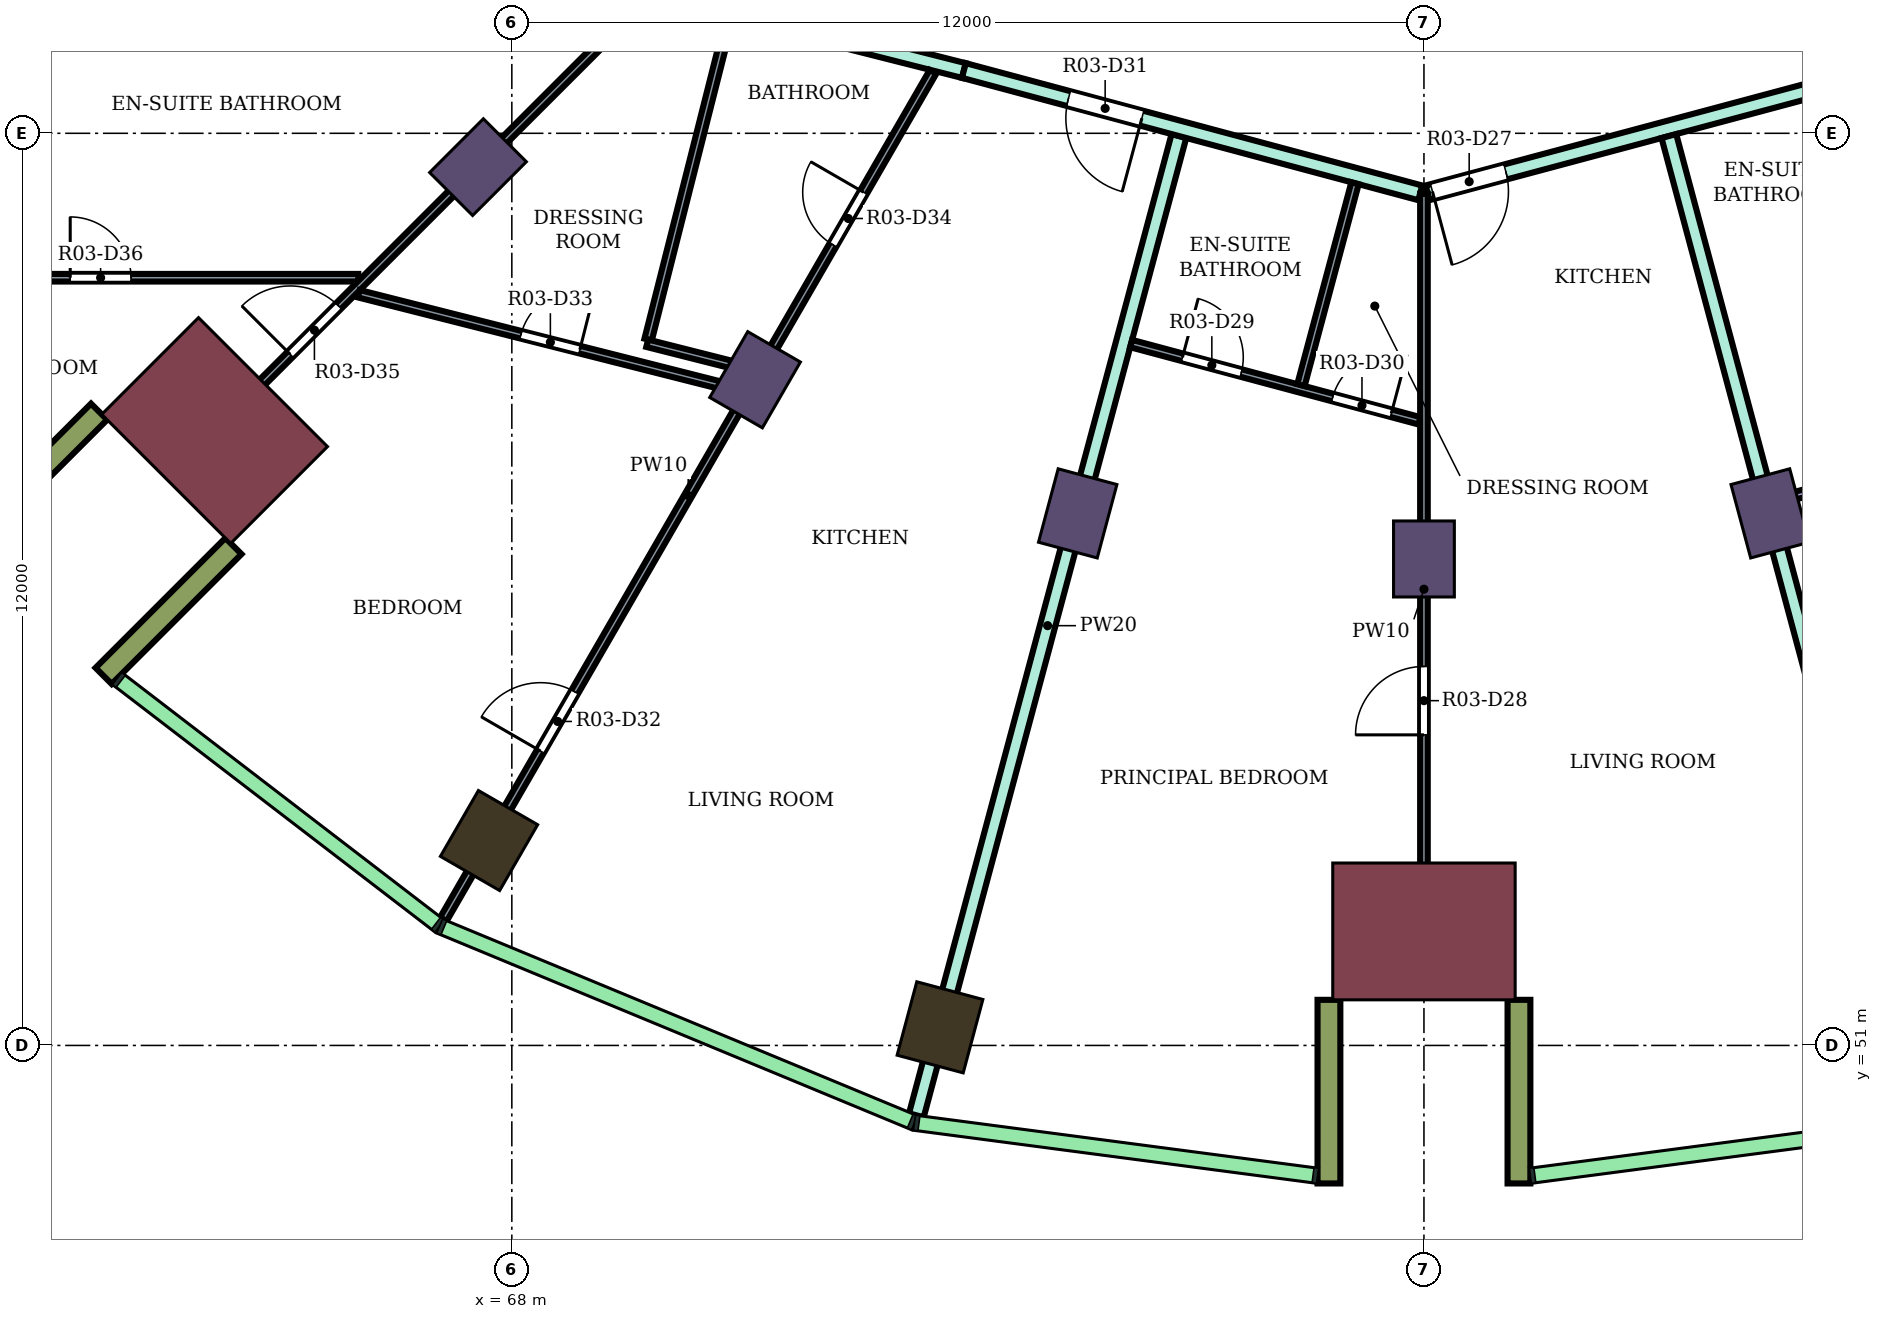
"""IFC4 building model, lengths in metres.
Left out: names, types, materials, properties, quantities, classifications, styles, units other than length and angle.
Written with IfcOpenShell. Run it as: python <this file> out.ifc"""

import sys

from ifc_helpers import new_model, si_unit, direction, frame, frame_2d, origin, origin_2d, place, context, subcontext, project, spatial, rectangle, extrude, element, fill, save


model = new_model("IFC4")
c1 = context("Model", 3, precision=1e-05, world=origin(), true_north=direction((0.0, 1.0)))
c2 = subcontext(c1, "Body", "Model", "MODEL_VIEW")
j1 = project(units=[si_unit("LENGTHUNIT", "METRE"), si_unit("PLANEANGLEUNIT", "RADIAN")], contexts=[c1])
p1 = place(None, origin())
s1 = spatial("IfcSite", under=j1, at=p1, CompositionType="ELEMENT")
p2 = place(p1, origin())
s2 = spatial("IfcBuilding", under=s1, at=p2, CompositionType="ELEMENT")
p3 = place(p2, frame((0.0, 0.0, 182.3)))
s3 = spatial("IfcBuildingStorey", under=s2, at=p3, CompositionType="ELEMENT", Elevation=182.3)
for number, where, z_axis, x_axis in (
    (1, (67.7, 53.696, 0.0), (0.0, 0.0, 1.0), (-0.5, -0.866, 0.0)),
    (2, (73.633, 51.238, 0.0), (0.0, 0.0, 1.0), (-0.259, -0.966, 0.0)),
):
    element("IfcColumn", number, at=place(p3, frame(where, z_axis=z_axis, x_axis=x_axis)), inside=s3, PredefinedType="COLUMN", context=c2, shape_type="SweptSolid", body=[
        extrude(rectangle(XDim=1.0, YDim=0.9, at=origin_2d()), origin(), (0.0, 0.0, 1.0), 4.1),
    ])
for number, where, z_axis, x_axis in (
    (3, (67.555, 62.555, 0.0), (0.0, 0.0, 1.0), (-0.707, -0.707, 0.0)),
    (4, (71.2, 59.758, 0.0), (0.0, 0.0, 1.0), (-0.5, -0.866, 0.0)),
    (5, (75.445, 58.0, 0.0), (0.0, 0.0, 1.0), (-0.259, -0.966, 0.0)),
    (6, (80.0, 57.4, 0.0), (0.0, 0.0, 1.0), (0.0, -1.0, 0.0)),
    (7, (84.555, 58.0, 0.0), (0.0, 0.0, 1.0), (0.259, -0.966, 0.0)),
):
    element("IfcColumn", number, at=place(p3, frame(where, z_axis=z_axis, x_axis=x_axis)), inside=s3, PredefinedType="COLUMN", context=c2, shape_type="SweptSolid", body=[
        extrude(rectangle(XDim=1.0, YDim=0.8, at=origin_2d()), origin(), (0.0, 0.0, 1.0), 4.1),
    ])
for number, where, z_axis, x_axis in (
    (8, (64.09, 59.09, 0.0), (0.0, 0.0, 1.0), (-0.707, -0.707, 0.0)),
    (9, (80.0, 52.5, 0.0), (0.0, 0.0, 1.0), (0.0, -1.0, 0.0)),
):
    element("IfcColumn", number, at=place(p3, frame(where, z_axis=z_axis, x_axis=x_axis)), inside=s3, PredefinedType="COLUMN", context=c2, shape_type="SweptSolid", body=[
        extrude(rectangle(XDim=1.8, YDim=2.4, at=origin_2d()), origin(), (0.0, 0.0, 1.0), 4.1),
    ])
for number, where, z_axis, x_axis in (
    (10, (62.57, 59.338, 0.0), (0.0, 0.0, 1.0), (-0.707, -0.707, 0.0)),
    (11, (64.338, 57.57, 0.0), (0.0, 0.0, 1.0), (-0.707, -0.707, 0.0)),
    (12, (78.75, 51.6, 0.0), (0.0, 0.0, 1.0), (0.0, -1.0, 0.0)),
    (13, (81.25, 51.6, 0.0), (0.0, 0.0, 1.0), (0.0, -1.0, 0.0)),
):
    element("IfcWall", number, at=place(p3, frame(where, z_axis=z_axis, x_axis=x_axis)), inside=s3, PredefinedType="NOTDEFINED", context=c2, shape_type="SweptSolid", body=[
        extrude(rectangle(XDim=2.416, YDim=0.3, at=frame_2d((1.208, 0.0))), origin(), (0.0, 0.0, 1.0), 4.1),
    ])
p4 = place(p3, frame((69.899, 64.85, 0.0), z_axis=(0.0, 0.0, 1.0), x_axis=(0.969429930153, -0.245368316057, 0.0)))
e14 = element("IfcWall", 14, at=p4, inside=s3, PredefinedType="PARTITIONING", context=c2, shape_type="SweptSolid", body=[
    extrude(rectangle(XDim=4.176, YDim=0.2, at=frame_2d((2.088, 0.0))), origin(), (0.0, 0.0, 1.0), 3.65),
])
p5 = place(p3, frame((73.322, 50.081, 0.0), z_axis=(0.0, 0.0, 1.0), x_axis=(0.258965725415, 0.965886511481, 0.0)))
e15 = element("IfcWall", 15, at=p5, inside=s3, PredefinedType="PARTITIONING", context=c2, shape_type="SweptSolid", body=[
    extrude(rectangle(XDim=13.338, YDim=0.2, at=frame_2d((6.669, 0.0))), origin(), (0.0, 0.0, 1.0), 3.65),
])
p6 = place(p3, frame((73.947, 63.826, 0.0), z_axis=(0.0, 0.0, 1.0), x_axis=(0.965898432367, -0.258921258979, 0.0)))
e16 = element("IfcWall", 16, at=p6, inside=s3, PredefinedType="PARTITIONING", context=c2, shape_type="SweptSolid", body=[
    extrude(rectangle(XDim=6.217, YDim=0.2, at=frame_2d((3.108, 0.0))), origin(), (0.0, 0.0, 1.0), 3.65),
])
p7 = place(p6, frame((1.424, 0.0, 0.0)))
e17 = element("IfcOpeningElement", 17, at=p7, cuts=e16, PredefinedType="OPENING", context=c2, shape_type="SweptSolid", body=[
    extrude(rectangle(XDim=1.0, YDim=2.1, at=frame_2d((0.5, 1.05))), frame((0.0, 0.11, 0.0), z_axis=(0.0, -1.0, 0.0), x_axis=(1.0, 0.0, 0.0)), (0.0, 0.0, 1.0), 0.22),
])
p8 = place(p3, frame((80.048, 62.217, 0.0), z_axis=(0.0, 0.0, 1.0), x_axis=(0.965967276872, 0.258664299841, 0.0)))
e18 = element("IfcWall", 18, at=p8, inside=s3, PredefinedType="PARTITIONING", context=c2, shape_type="SweptSolid", body=[
    extrude(rectangle(XDim=6.007, YDim=0.2, at=frame_2d((3.003, 0.0))), origin(), (0.0, 0.0, 1.0), 3.65),
])
p9 = place(p8, frame((0.066, 0.0, 0.0)))
e19 = element("IfcOpeningElement", 19, at=p9, cuts=e18, PredefinedType="OPENING", context=c2, shape_type="SweptSolid", body=[
    extrude(rectangle(XDim=1.0, YDim=2.1, at=frame_2d((0.5, 1.05))), frame((0.0, 0.11, 0.0), z_axis=(0.0, -1.0, 0.0), x_axis=(1.0, 0.0, 0.0)), (0.0, 0.0, 1.0), 0.22),
])
p10 = place(p3, frame((83.222, 62.964, 0.0), z_axis=(0.0, 0.0, 1.0), x_axis=(0.25865252128, -0.965970430829, 0.0)))
e20 = element("IfcWall", 20, at=p10, inside=s3, PredefinedType="PARTITIONING", context=c2, shape_type="SweptSolid", body=[
    extrude(rectangle(XDim=13.338, YDim=0.2, at=frame_2d((6.669, 0.0))), origin(), (0.0, 0.0, 1.0), 3.65),
])
p11 = place(p3, frame((58.379, 61.1, 0.0), z_axis=(0.0, 0.0, 1.0), x_axis=(1.0, 0.0, 0.0)))
e21 = element("IfcWall", 21, at=p11, inside=s3, PredefinedType="PARTITIONING", context=c2, shape_type="SweptSolid", body=[
    extrude(rectangle(XDim=7.601, YDim=0.1, at=frame_2d((3.801, 0.0))), origin(), (0.0, 0.0, 1.0), 3.65),
])
p12 = place(p11, frame((3.811, 0.0, 0.0)))
e22 = element("IfcOpeningElement", 22, at=p12, cuts=e21, PredefinedType="OPENING", context=c2, shape_type="SweptSolid", body=[
    extrude(rectangle(XDim=0.8, YDim=2.1, at=frame_2d((0.4, 1.05))), frame((0.0, 0.06, 0.0), z_axis=(0.0, -1.0, 0.0), x_axis=(1.0, 0.0, 0.0)), (0.0, 0.0, 1.0), 0.12),
])
p13 = place(p11, frame((1.075, 0.0, 0.0)))
e23 = element("IfcOpeningElement", 23, at=p13, cuts=e21, PredefinedType="OPENING", context=c2, shape_type="SweptSolid", body=[
    extrude(rectangle(XDim=0.8, YDim=2.1, at=frame_2d((0.4, 1.05))), frame((0.0, 0.06, 0.0), z_axis=(0.0, -1.0, 0.0), x_axis=(1.0, 0.0, 0.0)), (0.0, 0.0, 1.0), 0.12),
])
p14 = place(p3, frame((63.592, 58.6, 0.0), z_axis=(0.0, 0.0, 1.0), x_axis=(0.707272108928, 0.706941414781, 0.0)))
e24 = element("IfcWall", 24, at=p14, inside=s3, PredefinedType="PARTITIONING", context=c2, shape_type="SweptSolid", body=[
    extrude(rectangle(XDim=8.859, YDim=0.1, at=frame_2d((4.43, 0.0))), origin(), (0.0, 0.0, 1.0), 3.65),
])
p15 = place(p14, frame((2.111, 0.0, 0.0)))
e25 = element("IfcOpeningElement", 25, at=p15, cuts=e24, PredefinedType="OPENING", context=c2, shape_type="SweptSolid", body=[
    extrude(rectangle(XDim=0.9, YDim=2.1, at=frame_2d((0.45, 1.05))), frame((0.0, 0.06, 0.0), z_axis=(0.0, -1.0, 0.0), x_axis=(1.0, 0.0, 0.0)), (0.0, 0.0, 1.0), 0.12),
])
p16 = place(p3, frame((65.987, 60.889, 0.0), z_axis=(0.0, 0.0, 1.0), x_axis=(0.969431303535, -0.245362889871, 0.0)))
e26 = element("IfcWall", 26, at=p16, inside=s3, PredefinedType="PARTITIONING", context=c2, shape_type="SweptSolid", body=[
    extrude(rectangle(XDim=5.22, YDim=0.1, at=frame_2d((2.61, 0.0))), origin(), (0.0, 0.0, 1.0), 3.65),
])
p17 = place(p16, frame((2.2, 0.0, 0.0)))
e27 = element("IfcOpeningElement", 27, at=p17, cuts=e26, PredefinedType="OPENING", context=c2, shape_type="SweptSolid", body=[
    extrude(rectangle(XDim=0.8, YDim=2.1, at=frame_2d((0.4, 1.05))), frame((0.0, 0.06, 0.0), z_axis=(0.0, -1.0, 0.0), x_axis=(1.0, 0.0, 0.0)), (0.0, 0.0, 1.0), 0.12),
])
p18 = place(p3, frame((67.099, 52.66, 0.0), z_axis=(0.0, 0.0, 1.0), x_axis=(0.500286442712, 0.865859962834, 0.0)))
e28 = element("IfcWall", 28, at=p18, inside=s3, PredefinedType="PARTITIONING", context=c2, shape_type="SweptSolid", body=[
    extrude(rectangle(XDim=12.876, YDim=0.1, at=frame_2d((6.438, 0.0))), origin(), (0.0, 0.0, 1.0), 3.65),
])
p19 = place(p18, frame((2.556, 0.0, 0.0)))
e29 = element("IfcOpeningElement", 29, at=p19, cuts=e28, PredefinedType="OPENING", context=c2, shape_type="SweptSolid", body=[
    extrude(rectangle(XDim=0.9, YDim=2.1, at=frame_2d((0.45, 1.05))), frame((0.0, 0.06, 0.0), z_axis=(0.0, -1.0, 0.0), x_axis=(1.0, 0.0, 0.0)), (0.0, 0.0, 1.0), 0.12),
])
p20 = place(p18, frame((10.248, 0.0, 0.0)))
e30 = element("IfcOpeningElement", 30, at=p20, cuts=e28, PredefinedType="OPENING", context=c2, shape_type="SweptSolid", body=[
    extrude(rectangle(XDim=0.8, YDim=2.1, at=frame_2d((0.4, 1.05))), frame((0.0, 0.06, 0.0), z_axis=(0.0, -1.0, 0.0), x_axis=(1.0, 0.0, 0.0)), (0.0, 0.0, 1.0), 0.12),
])
p21 = place(p3, frame((69.793, 60.287, 0.0), z_axis=(0.0, 0.0, 1.0), x_axis=(0.245307703654, 0.969445269486, 0.0)))
e31 = element("IfcWall", 31, at=p21, inside=s3, PredefinedType="PARTITIONING", context=c2, shape_type="SweptSolid", body=[
    extrude(rectangle(XDim=4.35, YDim=0.1, at=frame_2d((2.175, 0.0))), origin(), (0.0, 0.0, 1.0), 3.65),
])
p22 = place(p3, frame((69.781, 60.238, 0.0), z_axis=(0.0, 0.0, 1.0), x_axis=(0.969502558328, -0.245081189397, 0.0)))
e32 = element("IfcWall", 32, at=p22, inside=s3, PredefinedType="PARTITIONING", context=c2, shape_type="SweptSolid", body=[
    extrude(rectangle(XDim=1.466, YDim=0.1, at=frame_2d((0.733, 0.0))), origin(), (0.0, 0.0, 1.0), 3.65),
])
p23 = place(p3, frame((76.147, 60.234, 0.0), z_axis=(0.0, 0.0, 1.0), x_axis=(0.965925861199, -0.258818914816, 0.0)))
e33 = element("IfcWall", 33, at=p23, inside=s3, PredefinedType="PARTITIONING", context=c2, shape_type="SweptSolid", body=[
    extrude(rectangle(XDim=3.929, YDim=0.1, at=frame_2d((1.964, 0.0))), origin(), (0.0, 0.0, 1.0), 3.65),
])
p24 = place(p23, frame((0.7, 0.0, 0.0)))
e34 = element("IfcOpeningElement", 34, at=p24, cuts=e33, PredefinedType="OPENING", context=c2, shape_type="SweptSolid", body=[
    extrude(rectangle(XDim=0.8, YDim=2.1, at=frame_2d((0.4, 1.05))), frame((0.0, 0.06, 0.0), z_axis=(0.0, -1.0, 0.0), x_axis=(1.0, 0.0, 0.0)), (0.0, 0.0, 1.0), 0.12),
])
p25 = place(p23, frame((2.745, 0.0, 0.0)))
e35 = element("IfcOpeningElement", 35, at=p25, cuts=e33, PredefinedType="OPENING", context=c2, shape_type="SweptSolid", body=[
    extrude(rectangle(XDim=0.8, YDim=2.1, at=frame_2d((0.4, 1.05))), frame((0.0, 0.06, 0.0), z_axis=(0.0, -1.0, 0.0), x_axis=(1.0, 0.0, 0.0)), (0.0, 0.0, 1.0), 0.12),
])
p26 = place(p3, frame((78.382, 59.687, 0.0), z_axis=(0.0, 0.0, 1.0), x_axis=(0.258629573817, 0.965976575051, 0.0)))
e36 = element("IfcWall", 36, at=p26, inside=s3, PredefinedType="PARTITIONING", context=c2, shape_type="SweptSolid", body=[
    extrude(rectangle(XDim=2.75, YDim=0.1, at=frame_2d((1.375, 0.0))), origin(), (0.0, 0.0, 1.0), 3.65),
])
p27 = place(p3, frame((80.0, 51.8, 0.0), z_axis=(0.0, 0.0, 1.0), x_axis=(0.0, 1.0, 0.0)))
e37 = element("IfcWall", 37, at=p27, inside=s3, PredefinedType="PARTITIONING", context=c2, shape_type="SweptSolid", body=[
    extrude(rectangle(XDim=10.404, YDim=0.1, at=frame_2d((5.202, 0.0))), origin(), (0.0, 0.0, 1.0), 3.65),
])
p28 = place(p27, frame((3.286, 0.0, 0.0)))
e38 = element("IfcOpeningElement", 38, at=p28, cuts=e37, PredefinedType="OPENING", context=c2, shape_type="SweptSolid", body=[
    extrude(rectangle(XDim=0.9, YDim=2.1, at=frame_2d((0.45, 1.05))), frame((0.0, 0.06, 0.0), z_axis=(0.0, -1.0, 0.0), x_axis=(1.0, 0.0, 0.0)), (0.0, 0.0, 1.0), 0.12),
])
p29 = place(p3, frame((84.615, 58.161, 0.0), z_axis=(0.0, 0.0, 1.0), x_axis=(0.965902408875, 0.258906424273, 0.0)))
e39 = element("IfcWall", 39, at=p29, inside=s3, PredefinedType="PARTITIONING", context=c2, shape_type="SweptSolid", body=[
    extrude(rectangle(XDim=2.651, YDim=0.1, at=frame_2d((1.325, 0.0))), origin(), (0.0, 0.0, 1.0), 3.28),
])
p30 = place(p9, frame((1.0, 0.0, 0.0), z_axis=(0.0, 0.0, 1.0), x_axis=(-1.0, 0.0, 0.0)))
e40 = element("IfcDoor", 40, at=p30, inside=s3, OperationType="SINGLE_SWING_RIGHT", PredefinedType="DOOR", context=c2, shape_type="SweptSolid", body=[
    extrude(rectangle(XDim=1.0, YDim=2.1, at=frame_2d((0.5, 1.05))), frame((0.0, 0.025, 0.0), z_axis=(0.0, -1.0, 0.0), x_axis=(1.0, 0.0, 0.0)), (0.0, 0.0, 1.0), 0.05),
])
fill(e19, e40)
p31 = place(p28, origin())
e41 = element("IfcDoor", 41, at=p31, inside=s3, OperationType="SINGLE_SWING_LEFT", PredefinedType="DOOR", context=c2, shape_type="SweptSolid", body=[
    extrude(rectangle(XDim=0.9, YDim=2.1, at=frame_2d((0.45, 1.05))), frame((0.0, 0.025, 0.0), z_axis=(0.0, -1.0, 0.0), x_axis=(1.0, 0.0, 0.0)), (0.0, 0.0, 1.0), 0.05),
])
fill(e38, e41)
p32 = place(p24, origin())
e42 = element("IfcDoor", 42, at=p32, inside=s3, OperationType="SINGLE_SWING_LEFT", PredefinedType="DOOR", context=c2, shape_type="SweptSolid", body=[
    extrude(rectangle(XDim=0.8, YDim=2.1, at=frame_2d((0.4, 1.05))), frame((0.0, 0.025, 0.0), z_axis=(0.0, -1.0, 0.0), x_axis=(1.0, 0.0, 0.0)), (0.0, 0.0, 1.0), 0.05),
])
fill(e34, e42)
p33 = place(p25, origin())
e43 = element("IfcDoor", 43, at=p33, inside=s3, OperationType="SINGLE_SWING_RIGHT", PredefinedType="DOOR", context=c2, shape_type="SweptSolid", body=[
    extrude(rectangle(XDim=0.8, YDim=2.1, at=frame_2d((0.4, 1.05))), frame((0.0, 0.025, 0.0), z_axis=(0.0, -1.0, 0.0), x_axis=(1.0, 0.0, 0.0)), (0.0, 0.0, 1.0), 0.05),
])
fill(e35, e43)
p34 = place(p7, frame((1.0, 0.0, 0.0), z_axis=(0.0, 0.0, 1.0), x_axis=(-1.0, 0.0, 0.0)))
e44 = element("IfcDoor", 44, at=p34, inside=s3, OperationType="SINGLE_SWING_LEFT", PredefinedType="DOOR", context=c2, shape_type="SweptSolid", body=[
    extrude(rectangle(XDim=1.0, YDim=2.1, at=frame_2d((0.5, 1.05))), frame((0.0, 0.025, 0.0), z_axis=(0.0, -1.0, 0.0), x_axis=(1.0, 0.0, 0.0)), (0.0, 0.0, 1.0), 0.05),
])
fill(e17, e44)
p35 = place(p19, origin())
e45 = element("IfcDoor", 45, at=p35, inside=s3, OperationType="SINGLE_SWING_LEFT", PredefinedType="DOOR", context=c2, shape_type="SweptSolid", body=[
    extrude(rectangle(XDim=0.9, YDim=2.1, at=frame_2d((0.45, 1.05))), frame((0.0, 0.025, 0.0), z_axis=(0.0, -1.0, 0.0), x_axis=(1.0, 0.0, 0.0)), (0.0, 0.0, 1.0), 0.05),
])
fill(e29, e45)
p36 = place(p17, origin())
e46 = element("IfcDoor", 46, at=p36, inside=s3, OperationType="SINGLE_SWING_RIGHT", PredefinedType="DOOR", context=c2, shape_type="SweptSolid", body=[
    extrude(rectangle(XDim=0.8, YDim=2.1, at=frame_2d((0.4, 1.05))), frame((0.0, 0.025, 0.0), z_axis=(0.0, -1.0, 0.0), x_axis=(1.0, 0.0, 0.0)), (0.0, 0.0, 1.0), 0.05),
])
fill(e27, e46)
p37 = place(p20, origin())
e47 = element("IfcDoor", 47, at=p37, inside=s3, OperationType="SINGLE_SWING_RIGHT", PredefinedType="DOOR", context=c2, shape_type="SweptSolid", body=[
    extrude(rectangle(XDim=0.8, YDim=2.1, at=frame_2d((0.4, 1.05))), frame((0.0, 0.025, 0.0), z_axis=(0.0, -1.0, 0.0), x_axis=(1.0, 0.0, 0.0)), (0.0, 0.0, 1.0), 0.05),
])
fill(e30, e47)
p38 = place(p15, origin())
e48 = element("IfcDoor", 48, at=p38, inside=s3, OperationType="SINGLE_SWING_LEFT", PredefinedType="DOOR", context=c2, shape_type="SweptSolid", body=[
    extrude(rectangle(XDim=0.9, YDim=2.1, at=frame_2d((0.45, 1.05))), frame((0.0, 0.025, 0.0), z_axis=(0.0, -1.0, 0.0), x_axis=(1.0, 0.0, 0.0)), (0.0, 0.0, 1.0), 0.05),
])
fill(e25, e48)
p39 = place(p12, origin())
e49 = element("IfcDoor", 49, at=p39, inside=s3, OperationType="SINGLE_SWING_LEFT", PredefinedType="DOOR", context=c2, shape_type="SweptSolid", body=[
    extrude(rectangle(XDim=0.8, YDim=2.1, at=frame_2d((0.4, 1.05))), frame((0.0, 0.025, 0.0), z_axis=(0.0, -1.0, 0.0), x_axis=(1.0, 0.0, 0.0)), (0.0, 0.0, 1.0), 0.05),
])
fill(e22, e49)
save(model, sys.argv[1])
